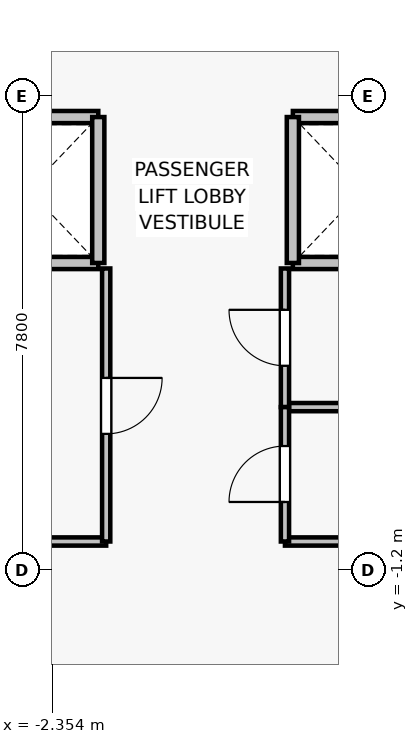
"""IFC4 building model, lengths in metres.
Left out: names, types, materials, properties, quantities, classifications, styles, units other than length and angle.
Written with IfcOpenShell. Run it as: python <this file> out.ifc"""

import sys

from ifc_helpers import new_model, si_unit, direction, frame, frame_2d, origin, place, context, subcontext, project, spatial, rectangle, extrude, source, transform, mapped, element, fill, save


model = new_model("IFC4")
c1 = context("Model", 3, precision=1e-05, world=origin(), true_north=direction((0.0, 1.0)))
c2 = subcontext(c1, "Body", "Model", "MODEL_VIEW")
j1 = project(units=[si_unit("LENGTHUNIT", "METRE"), si_unit("PLANEANGLEUNIT", "RADIAN")], contexts=[c1])
p1 = place(None, origin())
s1 = spatial("IfcSite", under=j1, at=p1, CompositionType="ELEMENT")
p2 = place(p1, origin())
s2 = spatial("IfcBuilding", under=s1, at=p2, CompositionType="ELEMENT")
p3 = place(p2, frame((0.0, 0.0, 40.6)))
s3 = spatial("IfcBuildingStorey", under=s2, at=p3, CompositionType="ELEMENT", Elevation=40.6)
for number, where, z_axis, x_axis in (
    (1, (-1.6, 3.85, 0.0), (0.0, 0.0, 1.0), (-1.0, 0.0, 0.0)),
    (2, (-3.9, 6.25, 0.0), (0.0, 0.0, 1.0), (1.0, 0.0, 0.0)),
):
    element("IfcWall", number, at=place(p3, frame(where, z_axis=z_axis, x_axis=x_axis)), inside=s3, PredefinedType="SOLIDWALL", context=c2, shape_type="SweptSolid", body=[
        extrude(rectangle(XDim=2.3, YDim=0.2, at=frame_2d((1.15, 0.0))), origin(), (0.0, 0.0, 1.0), 3.075),
    ])
p4 = place(p3, frame((-1.6, 6.25, 0.0), z_axis=(0.0, 0.0, 1.0), x_axis=(0.0, -1.0, 0.0)))
e3 = element("IfcWall", 3, at=p4, inside=s3, PredefinedType="SOLIDWALL", context=c2, shape_type="SweptSolid", body=[
    extrude(rectangle(XDim=2.4, YDim=0.2, at=frame_2d((1.2, 0.0))), origin(), (0.0, 0.0, 1.0), 3.075),
])
for number, where, z_axis, x_axis in (
    (4, (3.9, 3.85, 0.0), (0.0, 0.0, 1.0), (-1.0, 0.0, 0.0)),
    (5, (1.6, 6.25, 0.0), (0.0, 0.0, 1.0), (1.0, 0.0, 0.0)),
):
    element("IfcWall", number, at=place(p3, frame(where, z_axis=z_axis, x_axis=x_axis)), inside=s3, PredefinedType="SOLIDWALL", context=c2, shape_type="SweptSolid", body=[
        extrude(rectangle(XDim=2.3, YDim=0.2, at=frame_2d((1.15, 0.0))), origin(), (0.0, 0.0, 1.0), 3.075),
    ])
p5 = place(p3, frame((1.6, 3.85, 0.0), z_axis=(0.0, 0.0, 1.0), x_axis=(0.0, 1.0, 0.0)))
e6 = element("IfcWall", 6, at=p5, inside=s3, PredefinedType="SOLIDWALL", context=c2, shape_type="SweptSolid", body=[
    extrude(rectangle(XDim=2.4, YDim=0.2, at=frame_2d((1.2, 0.0))), origin(), (0.0, 0.0, 1.0), 3.075),
])
p6 = place(p3, frame((-1.47, -0.73, 0.0), z_axis=(0.0, 0.0, 1.0), x_axis=(-1.0, 0.0, 0.0)))
e7 = element("IfcWall", 7, at=p6, inside=s3, PredefinedType="PARTITIONING", context=c2, shape_type="SweptSolid", body=[
    extrude(rectangle(XDim=5.11, YDim=0.135, at=frame_2d((2.555, 0.0))), origin(), (0.0, 0.0, 1.0), 3.075),
])
p7 = place(p3, frame((-1.47, 3.76, 0.0), z_axis=(0.0, 0.0, 1.0), x_axis=(0.0, -1.0, 0.0)))
e8 = element("IfcWall", 8, at=p7, inside=s3, PredefinedType="PARTITIONING", context=c2, shape_type="SweptSolid", body=[
    extrude(rectangle(XDim=4.49, YDim=0.135, at=frame_2d((2.245, 0.0))), origin(), (0.0, 0.0, 1.0), 3.075),
])
p8 = place(p7, frame((1.8, 0.0, 0.0)))
e9 = element("IfcOpeningElement", 9, at=p8, cuts=e8, PredefinedType="OPENING", context=c2, shape_type="SweptSolid", body=[
    extrude(rectangle(XDim=0.92, YDim=2.1, at=frame_2d((0.46, 1.05))), frame((0.0, 0.077, 0.0), z_axis=(0.0, -1.0, 0.0), x_axis=(1.0, 0.0, 0.0)), (0.0, 0.0, 1.0), 0.155),
])
p9 = place(p3, frame((6.58, 1.48, 0.0), z_axis=(0.0, 0.0, 1.0), x_axis=(-1.0, 0.0, 0.0)))
e10 = element("IfcWall", 10, at=p9, inside=s3, PredefinedType="PARTITIONING", context=c2, shape_type="SweptSolid", body=[
    extrude(rectangle(XDim=5.11, YDim=0.135, at=frame_2d((2.555, 0.0))), origin(), (0.0, 0.0, 1.0), 3.075),
])
p10 = place(p3, frame((1.47, 1.48, 0.0), z_axis=(0.0, 0.0, 1.0), x_axis=(0.0, 1.0, 0.0)))
e11 = element("IfcWall", 11, at=p10, inside=s3, PredefinedType="PARTITIONING", context=c2, shape_type="SweptSolid", body=[
    extrude(rectangle(XDim=2.28, YDim=0.135, at=frame_2d((1.14, 0.0))), origin(), (0.0, 0.0, 1.0), 3.075),
])
p11 = place(p10, frame((0.68, 0.0, 0.0)))
e12 = element("IfcOpeningElement", 12, at=p11, cuts=e11, PredefinedType="OPENING", context=c2, shape_type="SweptSolid", body=[
    extrude(rectangle(XDim=0.92, YDim=2.1, at=frame_2d((0.46, 1.05))), frame((0.0, 0.077, 0.0), z_axis=(0.0, -1.0, 0.0), x_axis=(1.0, 0.0, 0.0)), (0.0, 0.0, 1.0), 0.155),
])
p12 = place(p3, frame((4.18, -0.73, 0.0), z_axis=(0.0, 0.0, 1.0), x_axis=(-1.0, 0.0, 0.0)))
e13 = element("IfcWall", 13, at=p12, inside=s3, PredefinedType="PARTITIONING", context=c2, shape_type="SweptSolid", body=[
    extrude(rectangle(XDim=2.71, YDim=0.135, at=frame_2d((1.355, 0.0))), origin(), (0.0, 0.0, 1.0), 3.075),
])
p13 = place(p3, frame((1.47, -0.73, 0.0), z_axis=(0.0, 0.0, 1.0), x_axis=(0.0, 1.0, 0.0)))
e14 = element("IfcWall", 14, at=p13, inside=s3, PredefinedType="PARTITIONING", context=c2, shape_type="SweptSolid", body=[
    extrude(rectangle(XDim=2.21, YDim=0.135, at=frame_2d((1.105, 0.0))), origin(), (0.0, 0.0, 1.0), 3.075),
])
p14 = place(p13, frame((0.65, 0.0, 0.0)))
e15 = element("IfcOpeningElement", 15, at=p14, cuts=e14, PredefinedType="OPENING", context=c2, shape_type="SweptSolid", body=[
    extrude(rectangle(XDim=0.92, YDim=2.1, at=frame_2d((0.46, 1.05))), frame((0.0, 0.077, 0.0), z_axis=(0.0, -1.0, 0.0), x_axis=(1.0, 0.0, 0.0)), (0.0, 0.0, 1.0), 0.155),
])
m1 = source(origin(), c2, "Body", "SweptSolid", [
    extrude(rectangle(XDim=0.92, YDim=2.1, at=frame_2d((0.46, 1.05))), frame((0.0, 0.025, 0.0), z_axis=(0.0, -1.0, 0.0), x_axis=(1.0, 0.0, 0.0)), (0.0, 0.0, 1.0), 0.05),
])
p15 = place(p8, origin())
e16 = element("IfcDoor", 16, at=p15, inside=s3, OperationType="SINGLE_SWING_LEFT", PredefinedType="DOOR", context=c2, shape_type="MappedRepresentation", body=[
    mapped(m1, transform((0.0, 0.0, 0.0), x_axis=(1.0, 0.0, 0.0), y_axis=(0.0, 1.0, 0.0), z_axis=(0.0, 0.0, 1.0), scale=1.0)),
])
fill(e9, e16)
p16 = place(p11, origin())
e17 = element("IfcDoor", 17, at=p16, inside=s3, OperationType="SINGLE_SWING_RIGHT", PredefinedType="DOOR", context=c2, shape_type="MappedRepresentation", body=[
    mapped(m1, transform((0.0, 0.0, 0.0), x_axis=(1.0, 0.0, 0.0), y_axis=(0.0, 1.0, 0.0), z_axis=(0.0, 0.0, 1.0), scale=1.0)),
])
fill(e12, e17)
p17 = place(p14, origin())
e18 = element("IfcDoor", 18, at=p17, inside=s3, OperationType="SINGLE_SWING_LEFT", PredefinedType="DOOR", context=c2, shape_type="MappedRepresentation", body=[
    mapped(m1, transform((0.0, 0.0, 0.0), x_axis=(1.0, 0.0, 0.0), y_axis=(0.0, 1.0, 0.0), z_axis=(0.0, 0.0, 1.0), scale=1.0)),
])
fill(e15, e18)
save(model, sys.argv[1])
